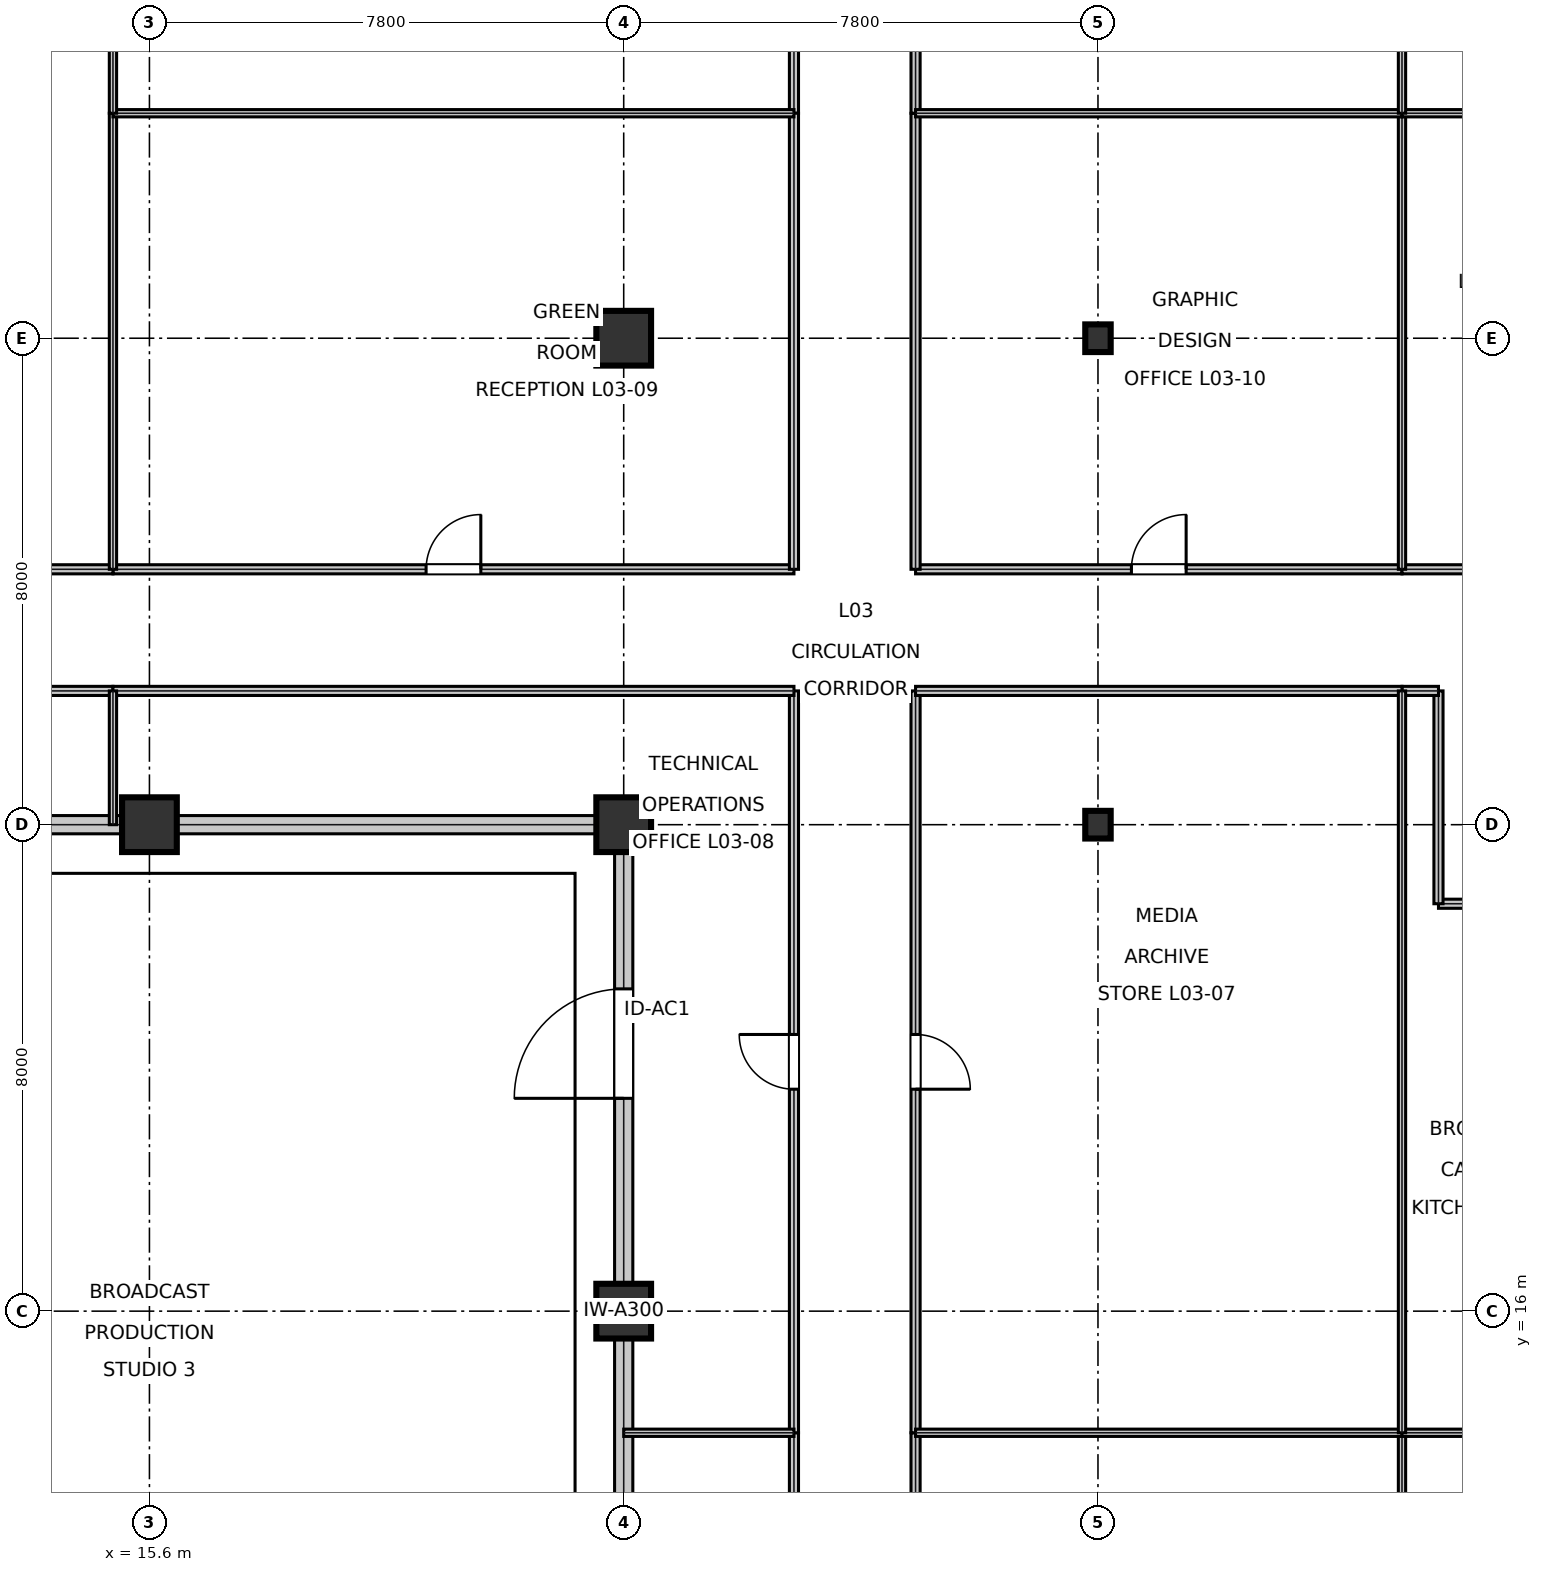
"""IFC4 building model, lengths in metres.
Left out: names, types, materials, properties, quantities, classifications, styles, units other than length and angle.
Written with IfcOpenShell. Run it as: python <this file> out.ifc"""

import sys

from ifc_helpers import new_model, si_unit, direction, frame, frame_2d, origin, origin_2d, place, context, subcontext, project, spatial, rectangle, i_section, extrude, element, fill, save


model = new_model("IFC4")
c1 = context("Model", 3, precision=1e-05, world=origin(), true_north=direction((0.0, 1.0)))
c2 = subcontext(c1, "Body", "Model", "MODEL_VIEW")
j1 = project(units=[si_unit("LENGTHUNIT", "METRE"), si_unit("PLANEANGLEUNIT", "RADIAN")], contexts=[c1])
p1 = place(None, origin())
s1 = spatial("IfcSite", under=j1, at=p1, CompositionType="ELEMENT")
p2 = place(p1, origin())
s2 = spatial("IfcBuilding", under=s1, at=p2, CompositionType="ELEMENT")
p3 = place(p2, frame((0.0, 0.0, 16.2)))
s3 = spatial("IfcBuildingStorey", under=s2, at=p3, CompositionType="ELEMENT", Elevation=16.2)
for number, where, z_axis, x_axis in (
    (1, (15.6, 24.0, 0.0), (0.0, 0.0, 1.0), (1.0, 0.0, 0.0)),
    (2, (23.4, 16.0, 0.0), (0.0, 0.0, 1.0), (1.0, 0.0, 0.0)),
    (3, (23.4, 24.0, 0.0), (0.0, 0.0, 1.0), (1.0, 0.0, 0.0)),
    (4, (23.4, 32.0, 0.0), (0.0, 0.0, 1.0), (1.0, 0.0, 0.0)),
):
    element("IfcColumn", number, at=place(p3, frame(where, z_axis=z_axis, x_axis=x_axis)), inside=s3, PredefinedType="COLUMN", context=c2, shape_type="SweptSolid", body=[
        extrude(rectangle(XDim=0.9, YDim=0.9, at=origin_2d()), origin(), (0.0, 0.0, 1.0), 5.395),
    ])
for number, where, z_axis, x_axis in (
    (5, (31.2, 24.0, 0.0), (0.0, 0.0, 1.0), (1.0, 0.0, 0.0)),
    (6, (31.2, 32.0, 0.0), (0.0, 0.0, 1.0), (1.0, 0.0, 0.0)),
):
    element("IfcColumn", number, at=place(p3, frame(where, z_axis=z_axis, x_axis=x_axis)), inside=s3, PredefinedType="COLUMN", context=c2, shape_type="SweptSolid", body=[
        extrude(i_section(OverallWidth=0.418, OverallDepth=0.455, WebThickness=0.042, FlangeThickness=0.068, at=origin_2d()), origin(), (0.0, 0.0, 1.0), 5.395),
    ])
p4 = place(p3, frame((23.4, 8.0, 0.0), z_axis=(0.0, 0.0, 1.0), x_axis=(0.0, 1.0, 0.0)))
e7 = element("IfcWall", 7, at=p4, inside=s3, PredefinedType="PARTITIONING", context=c2, shape_type="SweptSolid", body=[
    extrude(rectangle(XDim=16.0, YDim=0.3, at=frame_2d((8.0, 0.0))), origin(), (0.0, 0.0, 1.0), 3.688),
])
p5 = place(p4, frame((11.5, 0.0, 0.0)))
e8 = element("IfcOpeningElement", 8, at=p5, cuts=e7, PredefinedType="OPENING", context=c2, shape_type="SweptSolid", body=[
    extrude(rectangle(XDim=1.8, YDim=2.4, at=frame_2d((0.9, 1.2))), frame((0.0, 0.16, 0.0), z_axis=(0.0, -1.0, 0.0), x_axis=(1.0, 0.0, 0.0)), (0.0, 0.0, 1.0), 0.32),
])
p6 = place(p3, frame((7.8, 24.0, 0.0), z_axis=(0.0, 0.0, 1.0), x_axis=(1.0, 0.0, 0.0)))
e9 = element("IfcWall", 9, at=p6, inside=s3, PredefinedType="PARTITIONING", context=c2, shape_type="SweptSolid", body=[
    extrude(rectangle(XDim=15.6, YDim=0.3, at=frame_2d((7.8, 0.0))), origin(), (0.0, 0.0, 1.0), 3.688),
])
p7 = place(p3, frame((26.2, 2.5, 0.0), z_axis=(0.0, 0.0, 1.0), x_axis=(0.0, 1.0, 0.0)))
e10 = element("IfcWall", 10, at=p7, inside=s3, PredefinedType="PARTITIONING", context=c2, shape_type="SweptSolid", body=[
    extrude(rectangle(XDim=11.5, YDim=0.15, at=frame_2d((5.75, 0.0))), origin(), (0.0, 0.0, 1.0), 4.338),
])
p8 = place(p7, frame((5.3, 0.0, 0.0)))
e11 = element("IfcOpeningElement", 11, at=p8, cuts=e10, PredefinedType="OPENING", context=c2, shape_type="SweptSolid", body=[
    extrude(rectangle(XDim=0.9, YDim=2.15, at=frame_2d((0.45, 1.075))), frame((0.0, 0.085, 0.0), z_axis=(0.0, -1.0, 0.0), x_axis=(1.0, 0.0, 0.0)), (0.0, 0.0, 1.0), 0.17),
])
p9 = place(p3, frame((28.2, 4.5, 0.0), z_axis=(0.0, 0.0, 1.0), x_axis=(0.0, 1.0, 0.0)))
e12 = element("IfcWall", 12, at=p9, inside=s3, PredefinedType="PARTITIONING", context=c2, shape_type="SweptSolid", body=[
    extrude(rectangle(XDim=9.5, YDim=0.15, at=frame_2d((4.75, 0.0))), origin(), (0.0, 0.0, 1.0), 4.338),
])
p10 = place(p9, frame((4.3, 0.0, 0.0)))
e13 = element("IfcOpeningElement", 13, at=p10, cuts=e12, PredefinedType="OPENING", context=c2, shape_type="SweptSolid", body=[
    extrude(rectangle(XDim=0.9, YDim=2.15, at=frame_2d((0.45, 1.075))), frame((0.0, 0.085, 0.0), z_axis=(0.0, -1.0, 0.0), x_axis=(1.0, 0.0, 0.0)), (0.0, 0.0, 1.0), 0.17),
])
p11 = place(p3, frame((36.8, 22.7, 0.0), z_axis=(0.0, 0.0, 1.0), x_axis=(1.0, 0.0, 0.0)))
e14 = element("IfcWall", 14, at=p11, inside=s3, PredefinedType="PARTITIONING", context=c2, shape_type="SweptSolid", body=[
    extrude(rectangle(XDim=2.28, YDim=0.15, at=frame_2d((1.14, 0.0))), origin(), (0.0, 0.0, 1.0), 4.415),
])
p12 = place(p11, frame((0.665, 0.0, 0.0)))
e15 = element("IfcOpeningElement", 15, at=p12, cuts=e14, PredefinedType="OPENING", context=c2, shape_type="SweptSolid", body=[
    extrude(rectangle(XDim=0.95, YDim=2.15, at=frame_2d((0.475, 1.075))), frame((0.0, 0.085, 0.0), z_axis=(0.0, -1.0, 0.0), x_axis=(1.0, 0.0, 0.0)), (0.0, 0.0, 1.0), 0.17),
])
p13 = place(p3, frame((28.2, 14.0, 0.0), z_axis=(0.0, 0.0, 1.0), x_axis=(0.0, 1.0, 0.0)))
e16 = element("IfcWall", 16, at=p13, inside=s3, PredefinedType="PARTITIONING", context=c2, shape_type="SweptSolid", body=[
    extrude(rectangle(XDim=12.2, YDim=0.15, at=frame_2d((6.1, 0.0))), origin(), (0.0, 0.0, 1.0), 3.688),
])
p14 = place(p13, frame((5.65, 0.0, 0.0)))
e17 = element("IfcOpeningElement", 17, at=p14, cuts=e16, PredefinedType="OPENING", context=c2, shape_type="SweptSolid", body=[
    extrude(rectangle(XDim=0.9, YDim=2.15, at=frame_2d((0.45, 1.075))), frame((0.0, 0.085, 0.0), z_axis=(0.0, -1.0, 0.0), x_axis=(1.0, 0.0, 0.0)), (0.0, 0.0, 1.0), 0.17),
])
p15 = place(p3, frame((26.2, 14.0, 0.0), z_axis=(0.0, 0.0, 1.0), x_axis=(0.0, 1.0, 0.0)))
e18 = element("IfcWall", 18, at=p15, inside=s3, PredefinedType="PARTITIONING", context=c2, shape_type="SweptSolid", body=[
    extrude(rectangle(XDim=12.2, YDim=0.15, at=frame_2d((6.1, 0.0))), origin(), (0.0, 0.0, 1.0), 3.688),
])
p16 = place(p15, frame((5.65, 0.0, 0.0)))
e19 = element("IfcOpeningElement", 19, at=p16, cuts=e18, PredefinedType="OPENING", context=c2, shape_type="SweptSolid", body=[
    extrude(rectangle(XDim=0.9, YDim=2.15, at=frame_2d((0.45, 1.075))), frame((0.0, 0.085, 0.0), z_axis=(0.0, -1.0, 0.0), x_axis=(1.0, 0.0, 0.0)), (0.0, 0.0, 1.0), 0.17),
])
p17 = place(p3, frame((15.0, 28.2, 0.0), z_axis=(0.0, 0.0, 1.0), x_axis=(1.0, 0.0, 0.0)))
e20 = element("IfcWall", 20, at=p17, inside=s3, PredefinedType="PARTITIONING", context=c2, shape_type="SweptSolid", body=[
    extrude(rectangle(XDim=11.2, YDim=0.15, at=frame_2d((5.6, 0.0))), origin(), (0.0, 0.0, 1.0), 3.688),
])
p18 = place(p17, frame((5.15, 0.0, 0.0)))
e21 = element("IfcOpeningElement", 21, at=p18, cuts=e20, PredefinedType="OPENING", context=c2, shape_type="SweptSolid", body=[
    extrude(rectangle(XDim=0.9, YDim=2.15, at=frame_2d((0.45, 1.075))), frame((0.0, 0.085, 0.0), z_axis=(0.0, -1.0, 0.0), x_axis=(1.0, 0.0, 0.0)), (0.0, 0.0, 1.0), 0.17),
])
p19 = place(p3, frame((28.2, 28.2, 0.0), z_axis=(0.0, 0.0, 1.0), x_axis=(1.0, 0.0, 0.0)))
e22 = element("IfcWall", 22, at=p19, inside=s3, PredefinedType="PARTITIONING", context=c2, shape_type="SweptSolid", body=[
    extrude(rectangle(XDim=8.0, YDim=0.15, at=frame_2d((4.0, 0.0))), origin(), (0.0, 0.0, 1.0), 4.415),
])
p20 = place(p19, frame((3.55, 0.0, 0.0)))
e23 = element("IfcOpeningElement", 23, at=p20, cuts=e22, PredefinedType="OPENING", context=c2, shape_type="SweptSolid", body=[
    extrude(rectangle(XDim=0.9, YDim=2.15, at=frame_2d((0.45, 1.075))), frame((0.0, 0.085, 0.0), z_axis=(0.0, -1.0, 0.0), x_axis=(1.0, 0.0, 0.0)), (0.0, 0.0, 1.0), 0.17),
])
p21 = place(p3, frame((36.2, 28.2, 0.0), z_axis=(0.0, 0.0, 1.0), x_axis=(1.0, 0.0, 0.0)))
e24 = element("IfcWall", 24, at=p21, inside=s3, PredefinedType="PARTITIONING", context=c2, shape_type="SweptSolid", body=[
    extrude(rectangle(XDim=2.6, YDim=0.15, at=frame_2d((1.3, 0.0))), origin(), (0.0, 0.0, 1.0), 5.12),
])
p22 = place(p21, frame((1.185, 0.0, 0.0)))
e25 = element("IfcOpeningElement", 25, at=p22, cuts=e24, PredefinedType="OPENING", context=c2, shape_type="SweptSolid", body=[
    extrude(rectangle(XDim=0.95, YDim=2.15, at=frame_2d((0.475, 1.075))), frame((0.0, 0.085, 0.0), z_axis=(0.0, -1.0, 0.0), x_axis=(1.0, 0.0, 0.0)), (0.0, 0.0, 1.0), 0.17),
])
p23 = place(p3, frame((10.0, 26.2, 0.0), z_axis=(0.0, 0.0, 1.0), x_axis=(1.0, 0.0, 0.0)))
e26 = element("IfcWall", 26, at=p23, inside=s3, PredefinedType="PARTITIONING", context=c2, shape_type="SweptSolid", body=[
    extrude(rectangle(XDim=5.0, YDim=0.15, at=frame_2d((2.5, 0.0))), origin(), (0.0, 0.0, 1.0), 5.12),
])
p24 = place(p23, frame((2.05, 0.0, 0.0)))
e27 = element("IfcOpeningElement", 27, at=p24, cuts=e26, PredefinedType="OPENING", context=c2, shape_type="SweptSolid", body=[
    extrude(rectangle(XDim=0.9, YDim=2.15, at=frame_2d((0.45, 1.075))), frame((0.0, 0.085, 0.0), z_axis=(0.0, -1.0, 0.0), x_axis=(1.0, 0.0, 0.0)), (0.0, 0.0, 1.0), 0.17),
])
p25 = place(p3, frame((26.2, 35.7, 0.0), z_axis=(0.0, 0.0, 1.0), x_axis=(0.0, 1.0, 0.0)))
e28 = element("IfcWall", 28, at=p25, inside=s3, PredefinedType="PARTITIONING", context=c2, shape_type="SweptSolid", body=[
    extrude(rectangle(XDim=8.5, YDim=0.15, at=frame_2d((4.25, 0.0))), origin(), (0.0, 0.0, 1.0), 4.338),
])
p26 = place(p25, frame((3.8, 0.0, 0.0)))
e29 = element("IfcOpeningElement", 29, at=p26, cuts=e28, PredefinedType="OPENING", context=c2, shape_type="SweptSolid", body=[
    extrude(rectangle(XDim=0.9, YDim=2.15, at=frame_2d((0.45, 1.075))), frame((0.0, 0.085, 0.0), z_axis=(0.0, -1.0, 0.0), x_axis=(1.0, 0.0, 0.0)), (0.0, 0.0, 1.0), 0.17),
])
p27 = place(p3, frame((36.8, 22.7, 0.0), z_axis=(0.0, 0.0, 1.0), x_axis=(0.0, 1.0, 0.0)))
e30 = element("IfcWall", 30, at=p27, inside=s3, PredefinedType="PARTITIONING", context=c2, shape_type="SweptSolid", body=[
    extrude(rectangle(XDim=3.5, YDim=0.15, at=frame_2d((1.75, 0.0))), origin(), (0.0, 0.0, 1.0), 4.338),
])
p28 = place(p3, frame((36.2, 26.2, 0.0), z_axis=(0.0, 0.0, 1.0), x_axis=(1.0, 0.0, 0.0)))
e31 = element("IfcWall", 31, at=p28, inside=s3, PredefinedType="PARTITIONING", context=c2, shape_type="SweptSolid", body=[
    extrude(rectangle(XDim=0.6, YDim=0.15, at=frame_2d((0.3, 0.0))), origin(), (0.0, 0.0, 1.0), 5.12),
])
p29 = place(p3, frame((28.2, 26.2, 0.0), z_axis=(0.0, 0.0, 1.0), x_axis=(1.0, 0.0, 0.0)))
e32 = element("IfcWall", 32, at=p29, inside=s3, PredefinedType="PARTITIONING", context=c2, shape_type="SweptSolid", body=[
    extrude(rectangle(XDim=8.0, YDim=0.15, at=frame_2d((4.0, 0.0))), origin(), (0.0, 0.0, 1.0), 4.415),
])
p30 = place(p3, frame((15.0, 26.2, 0.0), z_axis=(0.0, 0.0, 1.0), x_axis=(1.0, 0.0, 0.0)))
e33 = element("IfcWall", 33, at=p30, inside=s3, PredefinedType="PARTITIONING", context=c2, shape_type="SweptSolid", body=[
    extrude(rectangle(XDim=11.2, YDim=0.15, at=frame_2d((5.6, 0.0))), origin(), (0.0, 0.0, 1.0), 3.688),
])
for number, where, z_axis, x_axis in (
    (34, (26.2, 28.2, 0.0), (0.0, 0.0, 1.0), (0.0, 1.0, 0.0)),
    (35, (28.2, 28.2, 0.0), (0.0, 0.0, 1.0), (0.0, 1.0, 0.0)),
):
    element("IfcWall", number, at=place(p3, frame(where, z_axis=z_axis, x_axis=x_axis)), inside=s3, PredefinedType="PARTITIONING", context=c2, shape_type="SweptSolid", body=[
        extrude(rectangle(XDim=7.5, YDim=0.15, at=frame_2d((3.75, 0.0))), origin(), (0.0, 0.0, 1.0), 4.338),
    ])
p31 = place(p3, frame((10.0, 28.2, 0.0), z_axis=(0.0, 0.0, 1.0), x_axis=(1.0, 0.0, 0.0)))
e36 = element("IfcWall", 36, at=p31, inside=s3, PredefinedType="PARTITIONING", context=c2, shape_type="SweptSolid", body=[
    extrude(rectangle(XDim=5.0, YDim=0.15, at=frame_2d((2.5, 0.0))), origin(), (0.0, 0.0, 1.0), 5.12),
])
p32 = place(p3, frame((28.2, 35.7, 0.0), z_axis=(0.0, 0.0, 1.0), x_axis=(0.0, 1.0, 0.0)))
e37 = element("IfcWall", 37, at=p32, inside=s3, PredefinedType="PARTITIONING", context=c2, shape_type="SweptSolid", body=[
    extrude(rectangle(XDim=6.5, YDim=0.15, at=frame_2d((3.25, 0.0))), origin(), (0.0, 0.0, 1.0), 4.338),
])
p33 = place(p3, frame((23.4, 14.0, 0.0), z_axis=(0.0, 0.0, 1.0), x_axis=(1.0, 0.0, 0.0)))
e38 = element("IfcWall", 38, at=p33, inside=s3, PredefinedType="PARTITIONING", context=c2, shape_type="SweptSolid", body=[
    extrude(rectangle(XDim=2.8, YDim=0.12, at=frame_2d((1.4, 0.0))), origin(), (0.0, 0.0, 1.0), 5.12),
])
p34 = place(p3, frame((36.2, 4.5, 0.0), z_axis=(0.0, 0.0, 1.0), x_axis=(0.0, 1.0, 0.0)))
e39 = element("IfcWall", 39, at=p34, inside=s3, PredefinedType="PARTITIONING", context=c2, shape_type="SweptSolid", body=[
    extrude(rectangle(XDim=9.5, YDim=0.12, at=frame_2d((4.75, 0.0))), origin(), (0.0, 0.0, 1.0), 4.338),
])
p35 = place(p3, frame((28.2, 14.0, 0.0), z_axis=(0.0, 0.0, 1.0), x_axis=(1.0, 0.0, 0.0)))
e40 = element("IfcWall", 40, at=p35, inside=s3, PredefinedType="PARTITIONING", context=c2, shape_type="SweptSolid", body=[
    extrude(rectangle(XDim=8.0, YDim=0.12, at=frame_2d((4.0, 0.0))), origin(), (0.0, 0.0, 1.0), 3.688),
])
p36 = place(p3, frame((36.2, 14.0, 0.0), z_axis=(0.0, 0.0, 1.0), x_axis=(1.0, 0.0, 0.0)))
e41 = element("IfcWall", 41, at=p36, inside=s3, PredefinedType="PARTITIONING", context=c2, shape_type="SweptSolid", body=[
    extrude(rectangle(XDim=10.6, YDim=0.12, at=frame_2d((5.3, 0.0))), origin(), (0.0, 0.0, 1.0), 4.415),
])
p37 = place(p3, frame((36.2, 14.0, 0.0), z_axis=(0.0, 0.0, 1.0), x_axis=(0.0, 1.0, 0.0)))
e42 = element("IfcWall", 42, at=p37, inside=s3, PredefinedType="PARTITIONING", context=c2, shape_type="SweptSolid", body=[
    extrude(rectangle(XDim=12.2, YDim=0.12, at=frame_2d((6.1, 0.0))), origin(), (0.0, 0.0, 1.0), 3.688),
])
p38 = place(p3, frame((15.0, 24.0, 0.0), z_axis=(0.0, 0.0, 1.0), x_axis=(0.0, 1.0, 0.0)))
e43 = element("IfcWall", 43, at=p38, inside=s3, PredefinedType="PARTITIONING", context=c2, shape_type="SweptSolid", body=[
    extrude(rectangle(XDim=2.2, YDim=0.12, at=frame_2d((1.1, 0.0))), origin(), (0.0, 0.0, 1.0), 4.338),
])
p39 = place(p3, frame((15.0, 28.2, 0.0), z_axis=(0.0, 0.0, 1.0), x_axis=(0.0, 1.0, 0.0)))
e44 = element("IfcWall", 44, at=p39, inside=s3, PredefinedType="PARTITIONING", context=c2, shape_type="SweptSolid", body=[
    extrude(rectangle(XDim=7.5, YDim=0.12, at=frame_2d((3.75, 0.0))), origin(), (0.0, 0.0, 1.0), 3.688),
])
p40 = place(p3, frame((15.0, 35.7, 0.0), z_axis=(0.0, 0.0, 1.0), x_axis=(1.0, 0.0, 0.0)))
e45 = element("IfcWall", 45, at=p40, inside=s3, PredefinedType="PARTITIONING", context=c2, shape_type="SweptSolid", body=[
    extrude(rectangle(XDim=11.2, YDim=0.12, at=frame_2d((5.6, 0.0))), origin(), (0.0, 0.0, 1.0), 3.688),
])
p41 = place(p3, frame((36.2, 28.2, 0.0), z_axis=(0.0, 0.0, 1.0), x_axis=(0.0, 1.0, 0.0)))
e46 = element("IfcWall", 46, at=p41, inside=s3, PredefinedType="PARTITIONING", context=c2, shape_type="SweptSolid", body=[
    extrude(rectangle(XDim=7.5, YDim=0.12, at=frame_2d((3.75, 0.0))), origin(), (0.0, 0.0, 1.0), 4.338),
])
p42 = place(p3, frame((28.2, 35.7, 0.0), z_axis=(0.0, 0.0, 1.0), x_axis=(1.0, 0.0, 0.0)))
e47 = element("IfcWall", 47, at=p42, inside=s3, PredefinedType="PARTITIONING", context=c2, shape_type="SweptSolid", body=[
    extrude(rectangle(XDim=8.0, YDim=0.12, at=frame_2d((4.0, 0.0))), origin(), (0.0, 0.0, 1.0), 4.415),
])
p43 = place(p3, frame((36.2, 35.7, 0.0), z_axis=(0.0, 0.0, 1.0), x_axis=(1.0, 0.0, 0.0)))
e48 = element("IfcWall", 48, at=p43, inside=s3, PredefinedType="PARTITIONING", context=c2, shape_type="SweptSolid", body=[
    extrude(rectangle(XDim=3.9, YDim=0.12, at=frame_2d((1.95, 0.0))), origin(), (0.0, 0.0, 1.0), 4.415),
])
p44 = place(p3, frame((15.0, 35.7, 0.0), z_axis=(0.0, 0.0, 1.0), x_axis=(0.0, 1.0, 0.0)))
e49 = element("IfcWall", 49, at=p44, inside=s3, PredefinedType="PARTITIONING", context=c2, shape_type="SweptSolid", body=[
    extrude(rectangle(XDim=17.3, YDim=0.12, at=frame_2d((8.65, 0.0))), origin(), (0.0, 0.0, 1.0), 4.338),
])
p45 = place(p3, frame((36.2, 35.7, 0.0), z_axis=(0.0, 0.0, 1.0), x_axis=(0.0, 1.0, 0.0)))
e50 = element("IfcWall", 50, at=p45, inside=s3, PredefinedType="PARTITIONING", context=c2, shape_type="SweptSolid", body=[
    extrude(rectangle(XDim=6.5, YDim=0.12, at=frame_2d((3.25, 0.0))), origin(), (0.0, 0.0, 1.0), 4.338),
])
p46 = place(p5, origin())
e51 = element("IfcDoor", 51, at=p46, inside=s3, OperationType="SINGLE_SWING_LEFT", PredefinedType="DOOR", context=c2, shape_type="SweptSolid", body=[
    extrude(rectangle(XDim=1.8, YDim=2.4, at=frame_2d((0.9, 1.2))), frame((0.0, 0.025, 0.0), z_axis=(0.0, -1.0, 0.0), x_axis=(1.0, 0.0, 0.0)), (0.0, 0.0, 1.0), 0.05),
])
fill(e8, e51)
p47 = place(p14, frame((0.9, 0.0, 0.0), z_axis=(0.0, 0.0, 1.0), x_axis=(-1.0, 0.0, 0.0)))
e52 = element("IfcDoor", 52, at=p47, inside=s3, OperationType="SINGLE_SWING_RIGHT", PredefinedType="DOOR", context=c2, shape_type="SweptSolid", body=[
    extrude(rectangle(XDim=0.9, YDim=2.15, at=frame_2d((0.45, 1.075))), frame((0.0, 0.025, 0.0), z_axis=(0.0, -1.0, 0.0), x_axis=(1.0, 0.0, 0.0)), (0.0, 0.0, 1.0), 0.05),
])
fill(e17, e52)
p48 = place(p16, origin())
e53 = element("IfcDoor", 53, at=p48, inside=s3, OperationType="SINGLE_SWING_RIGHT", PredefinedType="DOOR", context=c2, shape_type="SweptSolid", body=[
    extrude(rectangle(XDim=0.9, YDim=2.15, at=frame_2d((0.45, 1.075))), frame((0.0, 0.025, 0.0), z_axis=(0.0, -1.0, 0.0), x_axis=(1.0, 0.0, 0.0)), (0.0, 0.0, 1.0), 0.05),
])
fill(e19, e53)
p49 = place(p18, origin())
e54 = element("IfcDoor", 54, at=p49, inside=s3, OperationType="SINGLE_SWING_RIGHT", PredefinedType="DOOR", context=c2, shape_type="SweptSolid", body=[
    extrude(rectangle(XDim=0.9, YDim=2.15, at=frame_2d((0.45, 1.075))), frame((0.0, 0.025, 0.0), z_axis=(0.0, -1.0, 0.0), x_axis=(1.0, 0.0, 0.0)), (0.0, 0.0, 1.0), 0.05),
])
fill(e21, e54)
p50 = place(p20, origin())
e55 = element("IfcDoor", 55, at=p50, inside=s3, OperationType="SINGLE_SWING_RIGHT", PredefinedType="DOOR", context=c2, shape_type="SweptSolid", body=[
    extrude(rectangle(XDim=0.9, YDim=2.15, at=frame_2d((0.45, 1.075))), frame((0.0, 0.025, 0.0), z_axis=(0.0, -1.0, 0.0), x_axis=(1.0, 0.0, 0.0)), (0.0, 0.0, 1.0), 0.05),
])
fill(e23, e55)
save(model, sys.argv[1])
